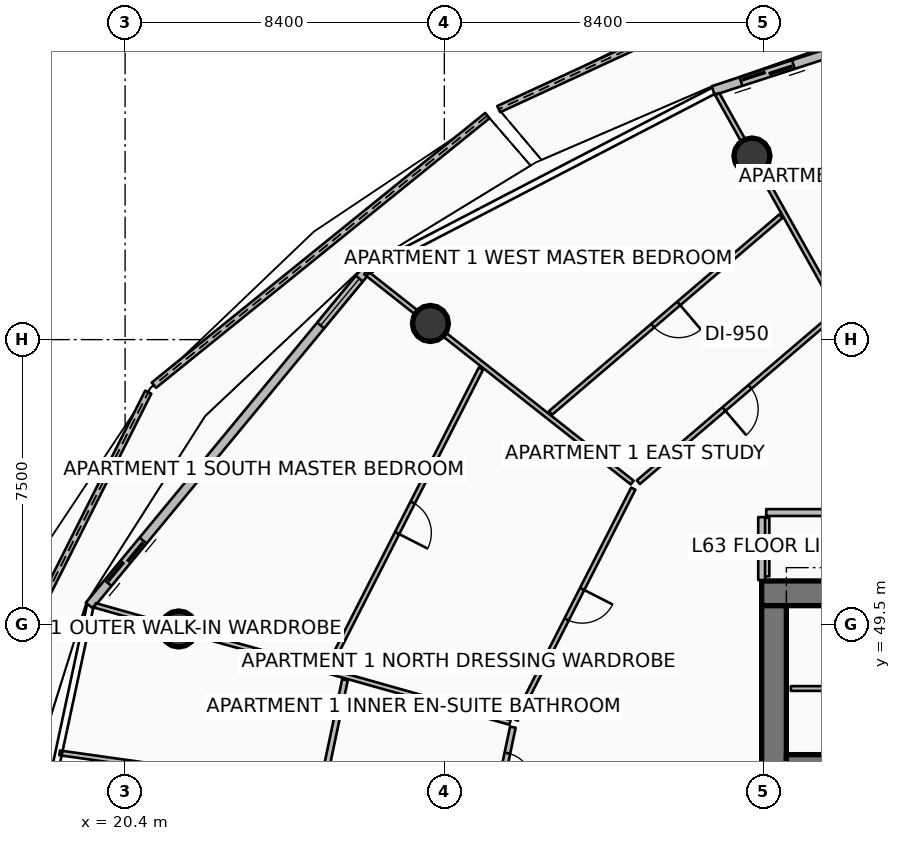
"""IFC4 building model, lengths in metres.
Left out: names, types, materials, properties, quantities, classifications, styles, units other than length and angle.
Written with IfcOpenShell. Run it as: python <this file> out.ifc"""

import sys

from ifc_helpers import new_model, si_unit, direction, frame, frame_2d, origin, origin_2d, place, context, subcontext, project, spatial, polyline, rectangle, circle, outline, extrude, element, fill, save


model = new_model("IFC4")
c1 = context("Model", 3, precision=1e-05, world=origin(), true_north=direction((0.0, 1.0)))
c2 = subcontext(c1, "Body", "Model", "MODEL_VIEW")
j1 = project(units=[si_unit("LENGTHUNIT", "METRE"), si_unit("PLANEANGLEUNIT", "RADIAN")], contexts=[c1])
p1 = place(None, origin())
s1 = spatial("IfcSite", under=j1, at=p1, CompositionType="ELEMENT")
p2 = place(p1, origin())
s2 = spatial("IfcBuilding", under=s1, at=p2, CompositionType="ELEMENT")
p3 = place(p2, frame((0.0, 0.0, 252.1)))
s3 = spatial("IfcBuildingStorey", under=s2, at=p3, CompositionType="ELEMENT", Elevation=252.1)
p4 = place(p3, frame((37.15, 50.325, 0.0), z_axis=(0.0, 0.0, 1.0), x_axis=(1.0, 0.0, 0.0)))
e1 = element("IfcWall", 1, at=p4, inside=s3, PredefinedType="SHEAR", context=c2, shape_type="SweptSolid", body=[
    extrude(rectangle(XDim=9.75, YDim=0.65, at=frame_2d((4.875, 0.0))), origin(), (0.0, 0.0, 1.0), 3.85),
])
p5 = place(p3, frame((37.475, 34.0, 0.0), z_axis=(0.0, 0.0, 1.0), x_axis=(0.0, 1.0, 0.0)))
e2 = element("IfcWall", 2, at=p5, inside=s3, PredefinedType="SHEAR", context=c2, shape_type="SweptSolid", body=[
    extrude(rectangle(XDim=16.0, YDim=0.65, at=frame_2d((8.0, 0.0))), origin(), (0.0, 0.0, 1.0), 3.85),
])
p6 = place(p3, frame((37.8, 45.94, 0.0), z_axis=(0.0, 0.0, 1.0), x_axis=(1.0, 0.0, 0.0)))
e3 = element("IfcWall", 3, at=p6, inside=s3, PredefinedType="SHEAR", context=c2, shape_type="SweptSolid", body=[
    extrude(rectangle(XDim=3.5, YDim=0.28, at=frame_2d((1.75, 0.0))), origin(), (0.0, 0.0, 1.0), 3.85),
])
for number, where, z_axis, x_axis in (
    (4, (36.895, 61.83, 0.0), (0.0, 0.0, 1.0), (1.0, 0.0, 0.0)),
    (5, (28.434, 57.425, 0.0), (0.0, 0.0, 1.0), (1.0, 0.0, 0.0)),
    (6, (21.809, 49.387, 0.0), (0.0, 0.0, 1.0), (1.0, 0.0, 0.0)),
):
    element("IfcColumn", number, at=place(p3, frame(where, z_axis=z_axis, x_axis=x_axis)), inside=s3, PredefinedType="COLUMN", context=c2, shape_type="SweptSolid", body=[
        extrude(circle(Radius=0.475, at=origin_2d()), origin(), (0.0, 0.0, 1.0), 3.59),
    ])
p7 = place(p3, frame((39.621, 67.402, 0.0), z_axis=(0.0, 0.0, 1.0), x_axis=(-0.907848132744, -0.419299138888, 0.0)))
e7 = element("IfcWall", 7, at=p7, inside=s3, PredefinedType="PARAPET", context=c2, shape_type="SweptSolid", body=[
    extrude(outline(polyline([(0.0, 0.0), (10.344, 0.0), (10.344, 1.233), (5.172, 1.418), (0.0, 1.632), (0.0, 0.0)])), frame((0.0, 0.09, 0.0), z_axis=(0.0, -1.0, 0.0), x_axis=(1.0, 0.0, 0.0)), (0.0, 0.0, 1.0), 0.18),
])
p8 = place(p3, frame((29.933, 62.895, 0.0), z_axis=(0.0, 0.0, 1.0), x_axis=(-0.777688536298, -0.628649775718, 0.0)))
e8 = element("IfcWall", 8, at=p8, inside=s3, PredefinedType="PARAPET", context=c2, shape_type="SweptSolid", body=[
    extrude(outline(polyline([(0.0, 0.0), (11.285, 0.0), (11.285, 1.148), (5.642, 1.127), (0.0, 1.224), (0.0, 0.0)])), frame((0.0, 0.09, 0.0), z_axis=(0.0, -1.0, 0.0), x_axis=(1.0, 0.0, 0.0)), (0.0, 0.0, 1.0), 0.18),
])
p9 = place(p3, frame((21.009, 55.618, 0.0), z_axis=(0.0, 0.0, 1.0), x_axis=(-0.449276289184, -0.893392867655, 0.0)))
e9 = element("IfcWall", 9, at=p9, inside=s3, PredefinedType="PARAPET", context=c2, shape_type="SweptSolid", body=[
    extrude(outline(polyline([(0.0, 0.0), (12.16, 0.0), (12.16, 1.483), (6.08, 1.284), (0.0, 1.148), (0.0, 0.0)])), frame((0.0, 0.09, 0.0), z_axis=(0.0, -1.0, 0.0), x_axis=(1.0, 0.0, 0.0)), (0.0, 0.0, 1.0), 0.18),
])
p10 = place(p3, frame((45.142, 66.564, 0.0), z_axis=(0.0, 0.0, 1.0), x_axis=(-0.951055974609, -0.309018661507, 0.0)))
e10 = element("IfcWall", 10, at=p10, inside=s3, PredefinedType="SOLIDWALL", context=c2, shape_type="SweptSolid", body=[
    extrude(rectangle(XDim=9.745, YDim=0.24, at=frame_2d((4.873, 0.0))), origin(), (0.0, 0.0, 1.0), 2.54),
])
p11 = place(p10, frame((7.525, 0.0, 0.0)))
e11 = element("IfcOpeningElement", 11, at=p11, cuts=e10, PredefinedType="OPENING", context=c2, shape_type="SweptSolid", body=[
    extrude(rectangle(XDim=1.45, YDim=2.15, at=frame_2d((0.725, 1.075))), frame((0.0, 0.13, 0.0), z_axis=(0.0, -1.0, 0.0), x_axis=(1.0, 0.0, 0.0)), (0.0, 0.0, 1.0), 0.26),
])
p12 = place(p10, frame((0.28, 0.0, 0.65)))
e12 = element("IfcOpeningElement", 12, at=p12, cuts=e10, PredefinedType="OPENING", context=c2, shape_type="SweptSolid", body=[
    extrude(rectangle(XDim=1.6, YDim=1.5, at=frame_2d((0.8, 0.75))), frame((0.0, 0.13, 0.0), z_axis=(0.0, -1.0, 0.0), x_axis=(1.0, 0.0, 0.0)), (0.0, 0.0, 1.0), 0.26),
])
p13 = place(p3, frame((26.742, 58.822, 0.0), z_axis=(0.0, 0.0, 1.0), x_axis=(-0.636680093065, -0.771128043255, 0.0)))
e13 = element("IfcWall", 13, at=p13, inside=s3, PredefinedType="SOLIDWALL", context=c2, shape_type="SweptSolid", body=[
    extrude(rectangle(XDim=11.438, YDim=0.24, at=frame_2d((5.719, 0.0))), origin(), (0.0, 0.0, 1.0), 2.54),
])
p14 = place(p13, frame((9.218, 0.0, 0.0)))
e14 = element("IfcOpeningElement", 14, at=p14, cuts=e13, PredefinedType="OPENING", context=c2, shape_type="SweptSolid", body=[
    extrude(rectangle(XDim=1.45, YDim=2.15, at=frame_2d((0.725, 1.075))), frame((0.0, 0.13, 0.0), z_axis=(0.0, -1.0, 0.0), x_axis=(1.0, 0.0, 0.0)), (0.0, 0.0, 1.0), 0.26),
])
p15 = place(p13, frame((0.28, 0.0, 0.65)))
e15 = element("IfcOpeningElement", 15, at=p15, cuts=e13, PredefinedType="OPENING", context=c2, shape_type="SweptSolid", body=[
    extrude(rectangle(XDim=1.6, YDim=1.5, at=frame_2d((0.8, 0.75))), frame((0.0, 0.13, 0.0), z_axis=(0.0, -1.0, 0.0), x_axis=(1.0, 0.0, 0.0)), (0.0, 0.0, 1.0), 0.26),
])
p16 = place(p3, frame((37.92, 47.82, 0.0), z_axis=(0.0, 0.0, 1.0), x_axis=(1.0, 0.0, 0.0)))
e16 = element("IfcWall", 16, at=p16, inside=s3, PredefinedType="PARTITIONING", context=c2, shape_type="SweptSolid", body=[
    extrude(rectangle(XDim=8.78, YDim=0.125, at=frame_2d((4.39, 0.0))), origin(), (0.0, 0.0, 1.0), 3.03),
])
p17 = place(p16, frame((3.965, 0.0, 0.0)))
e17 = element("IfcOpeningElement", 17, at=p17, cuts=e16, PredefinedType="OPENING", context=c2, shape_type="SweptSolid", body=[
    extrude(rectangle(XDim=0.85, YDim=2.06, at=frame_2d((0.425, 1.03))), frame((0.0, 0.073, 0.0), z_axis=(0.0, -1.0, 0.0), x_axis=(1.0, 0.0, 0.0)), (0.0, 0.0, 1.0), 0.145),
])
p18 = place(p3, frame((37.29, 50.77, 0.0), z_axis=(0.0, 0.0, 1.0), x_axis=(0.0, 1.0, 0.0)))
e18 = element("IfcWall", 18, at=p18, inside=s3, PredefinedType="PARTITIONING", context=c2, shape_type="SweptSolid", body=[
    extrude(rectangle(XDim=1.54, YDim=0.125, at=frame_2d((0.77, 0.0))), origin(), (0.0, 0.0, 1.0), 3.03),
])
p19 = place(p3, frame((42.028, 52.45, 0.0), z_axis=(0.0, 0.0, 1.0), x_axis=(-1.0, 0.0, 0.0)))
e19 = element("IfcWall", 19, at=p19, inside=s3, PredefinedType="PARTITIONING", context=c2, shape_type="SweptSolid", body=[
    extrude(rectangle(XDim=4.758, YDim=0.18, at=frame_2d((2.379, 0.0))), origin(), (0.0, 0.0, 1.0), 2.957),
])
p20 = place(p3, frame((37.15, 52.33, 0.0), z_axis=(0.0, 0.0, 1.0), x_axis=(0.0, -1.0, 0.0)))
e20 = element("IfcWall", 20, at=p20, inside=s3, PredefinedType="PARTITIONING", context=c2, shape_type="SweptSolid", body=[
    extrude(rectangle(XDim=1.656, YDim=0.18, at=frame_2d((0.828, 0.0))), origin(), (0.0, 0.0, 1.0), 2.957),
])
p21 = place(p3, frame((39.129, 57.839, 0.0), z_axis=(0.0, 0.0, 1.0), x_axis=(-0.488617220279, 0.872498259051, 0.0)))
e21 = element("IfcWall", 21, at=p21, inside=s3, PredefinedType="PARTITIONING", context=c2, shape_type="SweptSolid", body=[
    extrude(rectangle(XDim=6.441, YDim=0.125, at=frame_2d((3.22, 0.0))), origin(), (0.0, 0.0, 1.0), 2.957),
])
p22 = place(p3, frame((39.095, 57.681, 0.0), z_axis=(0.0, 0.0, 1.0), x_axis=(-0.760396866349, -0.649458702033, 0.0)))
e22 = element("IfcWall", 22, at=p22, inside=s3, PredefinedType="PARTITIONING", context=c2, shape_type="SweptSolid", body=[
    extrude(rectangle(XDim=6.824, YDim=0.125, at=frame_2d((3.412, 0.0))), origin(), (0.0, 0.0, 1.0), 2.957),
])
p23 = place(p22, frame((2.962, 0.0, 0.0)))
e23 = element("IfcOpeningElement", 23, at=p23, cuts=e22, PredefinedType="OPENING", context=c2, shape_type="SweptSolid", body=[
    extrude(rectangle(XDim=0.9, YDim=2.08, at=frame_2d((0.45, 1.04))), frame((0.0, 0.073, 0.0), z_axis=(0.0, -1.0, 0.0), x_axis=(1.0, 0.0, 0.0)), (0.0, 0.0, 1.0), 0.145),
])
p24 = place(p3, frame((37.657, 60.248, 0.0), z_axis=(0.0, 0.0, 1.0), x_axis=(-0.76041400447, -0.649438635905, 0.0)))
e24 = element("IfcWall", 24, at=p24, inside=s3, PredefinedType="PARTITIONING", context=c2, shape_type="SweptSolid", body=[
    extrude(rectangle(XDim=7.973, YDim=0.125, at=frame_2d((3.986, 0.0))), origin(), (0.0, 0.0, 1.0), 2.957),
])
p25 = place(p24, frame((3.536, 0.0, 0.0)))
e25 = element("IfcOpeningElement", 25, at=p25, cuts=e24, PredefinedType="OPENING", context=c2, shape_type="SweptSolid", body=[
    extrude(rectangle(XDim=0.9, YDim=2.08, at=frame_2d((0.45, 1.04))), frame((0.0, 0.073, 0.0), z_axis=(0.0, -1.0, 0.0), x_axis=(1.0, 0.0, 0.0)), (0.0, 0.0, 1.0), 0.145),
])
p26 = place(p3, frame((33.743, 53.239, 0.0), z_axis=(0.0, 0.0, 1.0), x_axis=(-0.785324118062, 0.619084832305, 0.0)))
e26 = element("IfcWall", 26, at=p26, inside=s3, PredefinedType="PARTITIONING", context=c2, shape_type="SweptSolid", body=[
    extrude(rectangle(XDim=8.931, YDim=0.125, at=frame_2d((4.465, 0.0))), origin(), (0.0, 0.0, 1.0), 2.957),
])
p27 = place(p3, frame((33.772, 53.079, 0.0), z_axis=(0.0, 0.0, 1.0), x_axis=(-0.454012060349, -0.890995538181, 0.0)))
e27 = element("IfcWall", 27, at=p27, inside=s3, PredefinedType="PARTITIONING", context=c2, shape_type="SweptSolid", body=[
    extrude(rectangle(XDim=6.824, YDim=0.125, at=frame_2d((3.412, 0.0))), origin(), (0.0, 0.0, 1.0), 2.957),
])
p28 = place(p27, frame((2.962, 0.0, 0.0)))
e28 = element("IfcOpeningElement", 28, at=p28, cuts=e27, PredefinedType="OPENING", context=c2, shape_type="SweptSolid", body=[
    extrude(rectangle(XDim=0.9, YDim=2.08, at=frame_2d((0.45, 1.04))), frame((0.0, 0.073, 0.0), z_axis=(0.0, -1.0, 0.0), x_axis=(1.0, 0.0, 0.0)), (0.0, 0.0, 1.0), 0.145),
])
p29 = place(p3, frame((29.764, 56.239, 0.0), z_axis=(0.0, 0.0, 1.0), x_axis=(-0.453980126594, -0.891011809494, 0.0)))
e29 = element("IfcWall", 29, at=p29, inside=s3, PredefinedType="PARTITIONING", context=c2, shape_type="SweptSolid", body=[
    extrude(rectangle(XDim=8.816, YDim=0.125, at=frame_2d((4.408, 0.0))), origin(), (0.0, 0.0, 1.0), 2.957),
])
p30 = place(p29, frame((3.958, 0.0, 0.0)))
e30 = element("IfcOpeningElement", 30, at=p30, cuts=e29, PredefinedType="OPENING", context=c2, shape_type="SweptSolid", body=[
    extrude(rectangle(XDim=0.9, YDim=2.08, at=frame_2d((0.45, 1.04))), frame((0.0, 0.073, 0.0), z_axis=(0.0, -1.0, 0.0), x_axis=(1.0, 0.0, 0.0)), (0.0, 0.0, 1.0), 0.145),
])
p31 = place(p3, frame((30.528, 46.928, 0.0), z_axis=(0.0, 0.0, 1.0), x_axis=(-0.962454146261, 0.271444315367, 0.0)))
e31 = element("IfcWall", 31, at=p31, inside=s3, PredefinedType="PARTITIONING", context=c2, shape_type="SweptSolid", body=[
    extrude(rectangle(XDim=11.342, YDim=0.125, at=frame_2d((5.671, 0.0))), origin(), (0.0, 0.0, 1.0), 2.957),
])
p32 = place(p3, frame((30.603, 46.803, 0.0), z_axis=(0.0, 0.0, 1.0), x_axis=(-0.205906433606, -0.978571683935, 0.0)))
e32 = element("IfcWall", 32, at=p32, inside=s3, PredefinedType="PARTITIONING", context=c2, shape_type="SweptSolid", body=[
    extrude(rectangle(XDim=2.247, YDim=0.15, at=frame_2d((1.124, 0.0))), origin(), (0.0, 0.0, 1.0), 2.957),
])
p33 = place(p32, frame((0.698, 0.0, 0.0)))
e33 = element("IfcOpeningElement", 33, at=p33, cuts=e32, PredefinedType="OPENING", context=c2, shape_type="SweptSolid", body=[
    extrude(rectangle(XDim=0.85, YDim=2.06, at=frame_2d((0.425, 1.03))), frame((0.0, 0.085, 0.0), z_axis=(0.0, -1.0, 0.0), x_axis=(1.0, 0.0, 0.0)), (0.0, 0.0, 1.0), 0.17),
])
p34 = place(p3, frame((26.186, 48.049, 0.0), z_axis=(0.0, 0.0, 1.0), x_axis=(-0.205851663269, -0.97858320685, 0.0)))
e34 = element("IfcWall", 34, at=p34, inside=s3, PredefinedType="PARTITIONING", context=c2, shape_type="SweptSolid", body=[
    extrude(rectangle(XDim=2.866, YDim=0.15, at=frame_2d((1.433, 0.0))), origin(), (0.0, 0.0, 1.0), 2.957),
])
p35 = place(p3, frame((25.488, 45.168, 0.0), z_axis=(0.0, 0.0, 1.0), x_axis=(-0.990239896804, 0.139373407717, 0.0)))
e35 = element("IfcWall", 35, at=p35, inside=s3, PredefinedType="PARTITIONING", context=c2, shape_type="SweptSolid", body=[
    extrude(rectangle(XDim=6.877, YDim=0.125, at=frame_2d((3.438, 0.0))), origin(), (0.0, 0.0, 1.0), 3.03),
])
p36 = place(p35, frame((3.014, 0.0, 0.0)))
e36 = element("IfcOpeningElement", 36, at=p36, cuts=e35, PredefinedType="OPENING", context=c2, shape_type="SweptSolid", body=[
    extrude(rectangle(XDim=0.85, YDim=2.06, at=frame_2d((0.425, 1.03))), frame((0.0, 0.073, 0.0), z_axis=(0.0, -1.0, 0.0), x_axis=(1.0, 0.0, 0.0)), (0.0, 0.0, 1.0), 0.145),
])
p37 = place(p11, origin())
e37 = element("IfcDoor", 37, at=p37, inside=s3, OperationType="DOUBLE_DOOR_SLIDING", PredefinedType="DOOR", context=c2, shape_type="SweptSolid", body=[
    extrude(rectangle(XDim=1.45, YDim=2.15, at=frame_2d((0.725, 1.075))), frame((0.0, 0.025, 0.0), z_axis=(0.0, -1.0, 0.0), x_axis=(1.0, 0.0, 0.0)), (0.0, 0.0, 1.0), 0.05),
])
fill(e11, e37)
p38 = place(p14, origin())
e38 = element("IfcDoor", 38, at=p38, inside=s3, OperationType="DOUBLE_DOOR_SLIDING", PredefinedType="DOOR", context=c2, shape_type="SweptSolid", body=[
    extrude(rectangle(XDim=1.45, YDim=2.15, at=frame_2d((0.725, 1.075))), frame((0.0, 0.025, 0.0), z_axis=(0.0, -1.0, 0.0), x_axis=(1.0, 0.0, 0.0)), (0.0, 0.0, 1.0), 0.05),
])
fill(e14, e38)
p39 = place(p15, origin())
e39 = element("IfcWindow", 39, at=p39, inside=s3, PartitioningType="SINGLE_PANEL", PredefinedType="WINDOW", context=c2, shape_type="SweptSolid", body=[
    extrude(rectangle(XDim=1.6, YDim=1.5, at=frame_2d((0.8, 0.75))), frame((0.0, 0.03, 0.0), z_axis=(0.0, -1.0, 0.0), x_axis=(1.0, 0.0, 0.0)), (0.0, 0.0, 1.0), 0.06),
])
fill(e15, e39)
p40 = place(p23, origin())
e40 = element("IfcDoor", 40, at=p40, inside=s3, OperationType="SINGLE_SWING_RIGHT", PredefinedType="DOOR", context=c2, shape_type="SweptSolid", body=[
    extrude(rectangle(XDim=0.9, YDim=2.08, at=frame_2d((0.45, 1.04))), frame((0.0, 0.025, 0.0), z_axis=(0.0, -1.0, 0.0), x_axis=(1.0, 0.0, 0.0)), (0.0, 0.0, 1.0), 0.05),
])
fill(e23, e40)
p41 = place(p25, origin())
e41 = element("IfcDoor", 41, at=p41, inside=s3, OperationType="SINGLE_SWING_LEFT", PredefinedType="DOOR", context=c2, shape_type="SweptSolid", body=[
    extrude(rectangle(XDim=0.9, YDim=2.08, at=frame_2d((0.45, 1.04))), frame((0.0, 0.025, 0.0), z_axis=(0.0, -1.0, 0.0), x_axis=(1.0, 0.0, 0.0)), (0.0, 0.0, 1.0), 0.05),
])
fill(e25, e41)
p42 = place(p28, origin())
e42 = element("IfcDoor", 42, at=p42, inside=s3, OperationType="SINGLE_SWING_LEFT", PredefinedType="DOOR", context=c2, shape_type="SweptSolid", body=[
    extrude(rectangle(XDim=0.9, YDim=2.08, at=frame_2d((0.45, 1.04))), frame((0.0, 0.025, 0.0), z_axis=(0.0, -1.0, 0.0), x_axis=(1.0, 0.0, 0.0)), (0.0, 0.0, 1.0), 0.05),
])
fill(e28, e42)
p43 = place(p30, origin())
e43 = element("IfcDoor", 43, at=p43, inside=s3, OperationType="SINGLE_SWING_RIGHT", PredefinedType="DOOR", context=c2, shape_type="SweptSolid", body=[
    extrude(rectangle(XDim=0.9, YDim=2.08, at=frame_2d((0.45, 1.04))), frame((0.0, 0.025, 0.0), z_axis=(0.0, -1.0, 0.0), x_axis=(1.0, 0.0, 0.0)), (0.0, 0.0, 1.0), 0.05),
])
fill(e30, e43)
p44 = place(p33, origin())
e44 = element("IfcDoor", 44, at=p44, inside=s3, OperationType="SINGLE_SWING_RIGHT", PredefinedType="DOOR", context=c2, shape_type="SweptSolid", body=[
    extrude(rectangle(XDim=0.85, YDim=2.06, at=frame_2d((0.425, 1.03))), frame((0.0, 0.025, 0.0), z_axis=(0.0, -1.0, 0.0), x_axis=(1.0, 0.0, 0.0)), (0.0, 0.0, 1.0), 0.05),
])
fill(e33, e44)
save(model, sys.argv[1])
